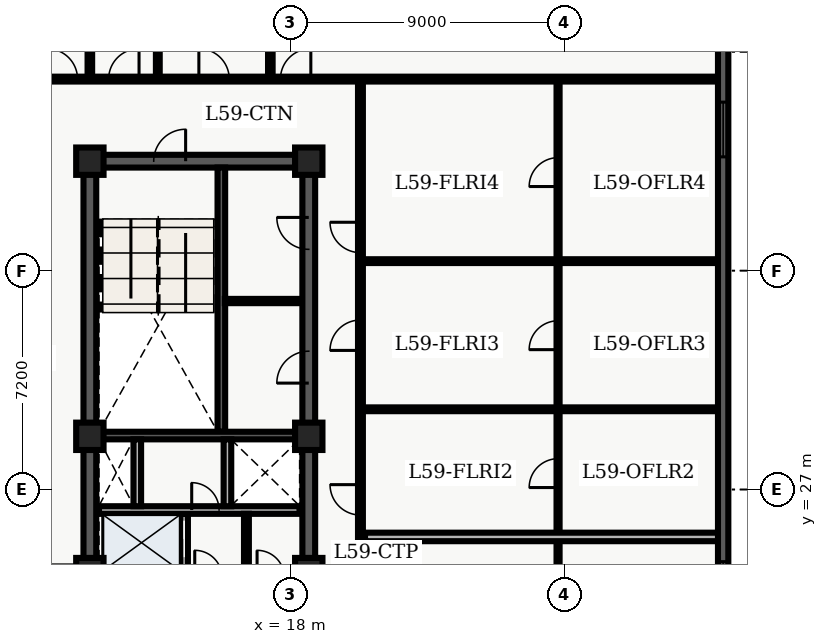
"""IFC4 building model, lengths in metres.
Left out: names, types, materials, properties, quantities, classifications, styles, units other than length and angle.
Written with IfcOpenShell. Run it as: python <this file> out.ifc"""

import sys

from ifc_helpers import new_model, entity, si_unit, converted_unit, direction, frame, origin_with_axes, origin_2d_with_axis, place, context, subcontext, project, spatial, polyline, rectangle, outline, extrude, element, fill, save


model = new_model("IFC4")
c1 = context("Model", 3, precision=1e-05, world=origin_with_axes(), true_north=direction((0.0, 1.0)))
c2 = subcontext(c1, "Body", "Model", "MODEL_VIEW")
j1 = project(units=[si_unit("LENGTHUNIT", "METRE"), converted_unit("PLANEANGLEUNIT", "DEGREE", entity("IfcPlaneAngleMeasure", 0.017), si_unit("PLANEANGLEUNIT", "RADIAN"), dimensions=[0, 0, 0, 0, 0, 0, 0])], contexts=[c1])
p1 = place(None, origin_with_axes())
s1 = spatial("IfcSite", under=j1, at=p1, CompositionType="ELEMENT")
p2 = place(p1, origin_with_axes())
s2 = spatial("IfcBuilding", under=s1, at=p2, CompositionType="ELEMENT")
p3 = place(p2, frame((0.0, 0.0, 240.3), z_axis=(0.0, 0.0, 1.0), x_axis=(1.0, 0.0, 0.0)))
s3 = spatial("IfcBuildingStorey", under=s2, at=p3, CompositionType="ELEMENT", Elevation=240.3)
p4 = place(p3, frame((11.4, 10.8, 0.0), z_axis=(0.0, 0.0, 1.0), x_axis=(0.0, 1.0, 0.0)))
e1 = element("IfcWall", 1, at=p4, inside=s3, PredefinedType="SHEAR", context=c2, shape_type="SweptSolid", body=[
    extrude(outline(polyline([(0.0, -0.21), (27.0, -0.21), (27.0, 0.21), (0.0, 0.21), (0.0, -0.21)])), origin_with_axes(), (0.0, 0.0, 1.0), 3.66),
])
p5 = place(p3, frame((11.4, 37.8, 0.0), z_axis=(0.0, 0.0, 1.0), x_axis=(1.0, 0.0, 0.0)))
e2 = element("IfcWall", 2, at=p5, inside=s3, PredefinedType="SHEAR", context=c2, shape_type="SweptSolid", body=[
    extrude(outline(polyline([(0.0, -0.21), (7.2, -0.21), (7.2, 0.21), (0.0, 0.21), (0.0, -0.21)])), origin_with_axes(), (0.0, 0.0, 1.0), 3.66),
])
p6 = place(p5, frame((2.625, 0.0, 0.0), z_axis=(0.0, 0.0, 1.0), x_axis=(1.0, 0.0, 0.0)))
e3 = element("IfcOpeningElement", 3, at=p6, cuts=e2, PredefinedType="OPENING", context=c2, shape_type="SweptSolid", body=[
    extrude(rectangle(XDim=1.05, YDim=0.44, at=origin_2d_with_axis()), origin_with_axes(), (0.0, 0.0, 1.0), 2.15),
])
p7 = place(p3, frame((18.6, 24.3, 0.0), z_axis=(0.0, 0.0, 1.0), x_axis=(0.0, 1.0, 0.0)))
e4 = element("IfcWall", 4, at=p7, inside=s3, PredefinedType="SHEAR", context=c2, shape_type="SweptSolid", body=[
    extrude(outline(polyline([(0.0, -0.21), (13.5, -0.21), (13.5, 0.21), (0.0, 0.21), (0.0, -0.21)])), origin_with_axes(), (0.0, 0.0, 1.0), 3.66),
])
p8 = place(p7, frame((6.725, 0.0, 0.0), z_axis=(0.0, 0.0, 1.0), x_axis=(1.0, 0.0, 0.0)))
e5 = element("IfcOpeningElement", 5, at=p8, cuts=e4, PredefinedType="OPENING", context=c2, shape_type="SweptSolid", body=[
    extrude(rectangle(XDim=1.05, YDim=0.44, at=origin_2d_with_axis()), origin_with_axes(), (0.0, 0.0, 1.0), 2.15),
])
p9 = place(p7, frame((11.125, 0.0, 0.0), z_axis=(0.0, 0.0, 1.0), x_axis=(1.0, 0.0, 0.0)))
e6 = element("IfcOpeningElement", 6, at=p9, cuts=e4, PredefinedType="OPENING", context=c2, shape_type="SweptSolid", body=[
    extrude(rectangle(XDim=1.05, YDim=0.44, at=origin_2d_with_axis()), origin_with_axes(), (0.0, 0.0, 1.0), 2.15),
])
p10 = place(p3, frame((15.725, 28.9, 0.0), z_axis=(0.0, 0.0, 1.0), x_axis=(0.0, 1.0, 0.0)))
e7 = element("IfcWall", 7, at=p10, inside=s3, PredefinedType="SHEAR", context=c2, shape_type="SweptSolid", body=[
    extrude(outline(polyline([(0.0, -0.125), (8.69, -0.125), (8.69, 0.125), (0.0, 0.125), (0.0, -0.125)])), origin_with_axes(), (0.0, 0.0, 1.0), 3.66),
])
p11 = place(p3, frame((11.61, 28.775, 0.0), z_axis=(0.0, 0.0, 1.0), x_axis=(1.0, 0.0, 0.0)))
e8 = element("IfcWall", 8, at=p11, inside=s3, PredefinedType="SHEAR", context=c2, shape_type="SweptSolid", body=[
    extrude(outline(polyline([(0.0, -0.125), (6.78, -0.125), (6.78, 0.125), (0.0, 0.125), (0.0, -0.125)])), origin_with_axes(), (0.0, 0.0, 1.0), 3.66),
])
p12 = place(p3, frame((14.5, 19.95, 0.0), z_axis=(0.0, 0.0, 1.0), x_axis=(0.0, 1.0, 0.0)))
e9 = element("IfcWall", 9, at=p12, inside=s3, PredefinedType="SOLIDWALL", context=c2, shape_type="SweptSolid", body=[
    extrude(outline(polyline([(0.0, -0.125), (6.25, -0.125), (6.25, 0.125), (0.0, 0.125), (0.0, -0.125)])), origin_with_axes(), (0.0, 0.0, 1.0), 2.7),
])
p13 = place(p12, frame((1.025, 0.0, 0.0), z_axis=(0.0, 0.0, 1.0), x_axis=(1.0, 0.0, 0.0)))
e10 = element("IfcOpeningElement", 10, at=p13, cuts=e9, PredefinedType="OPENING", context=c2, shape_type="SweptSolid", body=[
    extrude(rectangle(XDim=1.1, YDim=0.27, at=origin_2d_with_axis()), origin_with_axes(), (0.0, 0.0, 1.0), 2.15),
])
p14 = place(p12, frame((2.975, 0.0, 0.0), z_axis=(0.0, 0.0, 1.0), x_axis=(1.0, 0.0, 0.0)))
e11 = element("IfcOpeningElement", 11, at=p14, cuts=e9, PredefinedType="OPENING", context=c2, shape_type="SweptSolid", body=[
    extrude(rectangle(XDim=1.1, YDim=0.27, at=origin_2d_with_axis()), origin_with_axes(), (0.0, 0.0, 1.0), 2.15),
])
p15 = place(p12, frame((5.425, 0.0, 0.0), z_axis=(0.0, 0.0, 1.0), x_axis=(1.0, 0.0, 0.0)))
e12 = element("IfcOpeningElement", 12, at=p15, cuts=e9, PredefinedType="OPENING", context=c2, shape_type="SweptSolid", body=[
    extrude(rectangle(XDim=1.2, YDim=0.27, at=origin_2d_with_axis()), origin_with_axes(), (0.0, 0.0, 1.0), 2.15),
])
p16 = place(p3, frame((11.7, 26.325, 0.0), z_axis=(0.0, 0.0, 1.0), x_axis=(1.0, 0.0, 0.0)))
e13 = element("IfcWall", 13, at=p16, inside=s3, PredefinedType="SOLIDWALL", context=c2, shape_type="SweptSolid", body=[
    extrude(outline(polyline([(0.0, -0.125), (6.6, -0.125), (6.6, 0.125), (0.0, 0.125), (0.0, -0.125)])), origin_with_axes(), (0.0, 0.0, 1.0), 2.7),
])
p17 = place(p16, frame((3.5, 0.0, 0.0), z_axis=(0.0, 0.0, 1.0), x_axis=(1.0, 0.0, 0.0)))
e14 = element("IfcOpeningElement", 14, at=p17, cuts=e13, PredefinedType="OPENING", context=c2, shape_type="SweptSolid", body=[
    extrude(rectangle(XDim=0.9, YDim=0.27, at=origin_2d_with_axis()), origin_with_axes(), (0.0, 0.0, 1.0), 2.15),
])
for number, where, z_axis, x_axis in (
    (15, (12.96, 26.45, 0.0), (0.0, 0.0, 1.0), (0.0, 1.0, 0.0)),
    (16, (15.925, 26.45, 0.0), (0.0, 0.0, 1.0), (0.0, 1.0, 0.0)),
):
    element("IfcWall", number, at=place(p3, frame(where, z_axis=z_axis, x_axis=x_axis)), inside=s3, PredefinedType="SOLIDWALL", context=c2, shape_type="SweptSolid", body=[
        extrude(outline(polyline([(0.0, -0.125), (2.2, -0.125), (2.2, 0.125), (0.0, 0.125), (0.0, -0.125)])), origin_with_axes(), (0.0, 0.0, 1.0), 2.7),
    ])
for number, where, z_axis, x_axis in (
    (17, (11.4, 24.3, 0.0), (0.0, 0.0, 1.0), (1.0, 0.0, 0.0)),
    (18, (11.4, 28.75, 0.0), (0.0, 0.0, 1.0), (1.0, 0.0, 0.0)),
    (19, (11.4, 37.8, 0.0), (0.0, 0.0, 1.0), (1.0, 0.0, 0.0)),
    (20, (18.6, 24.3, 0.0), (0.0, 0.0, 1.0), (1.0, 0.0, 0.0)),
    (21, (18.6, 28.75, 0.0), (0.0, 0.0, 1.0), (1.0, 0.0, 0.0)),
    (22, (18.6, 37.8, 0.0), (0.0, 0.0, 1.0), (1.0, 0.0, 0.0)),
):
    element("IfcColumn", number, at=place(p3, frame(where, z_axis=z_axis, x_axis=x_axis)), inside=s3, PredefinedType="COLUMN", context=c2, shape_type="SweptSolid", body=[
        extrude(rectangle(XDim=0.9, YDim=0.9, at=origin_2d_with_axis()), origin_with_axes(), (0.0, 0.0, 1.0), 3.9),
    ])
p18 = place(p3, frame((16.55, 24.22, 0.0), z_axis=(0.0, 0.0, 1.0), x_axis=(0.0, 1.0, 0.0)))
e23 = element("IfcWall", 23, at=p18, inside=s3, PredefinedType="PARTITIONING", context=c2, shape_type="SweptSolid", body=[
    extrude(outline(polyline([(0.0, -0.08), (1.98, -0.08), (1.98, 0.08), (0.0, 0.08), (0.0, -0.08)])), origin_with_axes(), (0.0, 0.0, 1.0), 2.7),
])
p19 = place(p3, frame((15.84, 33.2, 0.0), z_axis=(0.0, 0.0, 1.0), x_axis=(1.0, 0.0, 0.0)))
e24 = element("IfcWall", 24, at=p19, inside=s3, PredefinedType="PARTITIONING", context=c2, shape_type="SweptSolid", body=[
    extrude(outline(polyline([(0.0, -0.07), (2.46, -0.07), (2.46, 0.07), (0.0, 0.07), (0.0, -0.07)])), origin_with_axes(), (0.0, 0.0, 1.0), 2.7),
])
p20 = place(p3, frame((7.1, 40.5, 0.0), z_axis=(0.0, 0.0, 1.0), x_axis=(1.0, 0.0, 0.0)))
e25 = element("IfcWall", 25, at=p20, inside=s3, PredefinedType="PARTITIONING", context=c2, shape_type="SweptSolid", body=[
    extrude(outline(polyline([(0.0, -0.08), (24.965, -0.08), (24.965, 0.08), (0.0, 0.08), (0.0, -0.08)])), origin_with_axes(), (0.0, 0.0, 1.0), 2.7),
])
p21 = place(p20, frame((3.395, 0.0, 0.0), z_axis=(0.0, 0.0, 1.0), x_axis=(1.0, 0.0, 0.0)))
e26 = element("IfcOpeningElement", 26, at=p21, cuts=e25, PredefinedType="OPENING", context=c2, shape_type="SweptSolid", body=[
    extrude(rectangle(XDim=1.0, YDim=0.18, at=origin_2d_with_axis()), origin_with_axes(), (0.0, 0.0, 1.0), 2.15),
])
p22 = place(p20, frame((5.418, 0.0, 0.0), z_axis=(0.0, 0.0, 1.0), x_axis=(1.0, 0.0, 0.0)))
e27 = element("IfcOpeningElement", 27, at=p22, cuts=e25, PredefinedType="OPENING", context=c2, shape_type="SweptSolid", body=[
    extrude(rectangle(XDim=1.0, YDim=0.18, at=origin_2d_with_axis()), origin_with_axes(), (0.0, 0.0, 1.0), 2.15),
])
p23 = place(p20, frame((8.386, 0.0, 0.0), z_axis=(0.0, 0.0, 1.0), x_axis=(1.0, 0.0, 0.0)))
e28 = element("IfcOpeningElement", 28, at=p23, cuts=e25, PredefinedType="OPENING", context=c2, shape_type="SweptSolid", body=[
    extrude(rectangle(XDim=1.0, YDim=0.18, at=origin_2d_with_axis()), origin_with_axes(), (0.0, 0.0, 1.0), 2.15),
])
p24 = place(p20, frame((11.068, 0.0, 0.0), z_axis=(0.0, 0.0, 1.0), x_axis=(1.0, 0.0, 0.0)))
e29 = element("IfcOpeningElement", 29, at=p24, cuts=e25, PredefinedType="OPENING", context=c2, shape_type="SweptSolid", body=[
    extrude(rectangle(XDim=1.0, YDim=0.18, at=origin_2d_with_axis()), origin_with_axes(), (0.0, 0.0, 1.0), 2.15),
])
p25 = place(p3, frame((20.3, 7.8, 0.0), z_axis=(0.0, 0.0, 1.0), x_axis=(0.0, 1.0, 0.0)))
e30 = element("IfcWall", 30, at=p25, inside=s3, PredefinedType="PARTITIONING", context=c2, shape_type="SweptSolid", body=[
    extrude(outline(polyline([(0.0, -0.08), (32.7, -0.08), (32.7, 0.08), (0.0, 0.08), (0.0, -0.08)])), origin_with_axes(), (0.0, 0.0, 1.0), 2.7),
])
p26 = place(p25, frame((14.55, 0.0, 0.0), z_axis=(0.0, 0.0, 1.0), x_axis=(1.0, 0.0, 0.0)))
e31 = element("IfcOpeningElement", 31, at=p26, cuts=e30, PredefinedType="OPENING", context=c2, shape_type="SweptSolid", body=[
    extrude(rectangle(XDim=0.9, YDim=0.18, at=origin_2d_with_axis()), origin_with_axes(), (0.0, 0.0, 1.0), 2.15),
])
p27 = place(p25, frame((18.86, 0.0, 0.0), z_axis=(0.0, 0.0, 1.0), x_axis=(1.0, 0.0, 0.0)))
e32 = element("IfcOpeningElement", 32, at=p27, cuts=e30, PredefinedType="OPENING", context=c2, shape_type="SweptSolid", body=[
    extrude(rectangle(XDim=1.0, YDim=0.18, at=origin_2d_with_axis()), origin_with_axes(), (0.0, 0.0, 1.0), 2.15),
])
p28 = place(p25, frame((24.276, 0.0, 0.0), z_axis=(0.0, 0.0, 1.0), x_axis=(1.0, 0.0, 0.0)))
e33 = element("IfcOpeningElement", 33, at=p28, cuts=e30, PredefinedType="OPENING", context=c2, shape_type="SweptSolid", body=[
    extrude(rectangle(XDim=1.0, YDim=0.18, at=origin_2d_with_axis()), origin_with_axes(), (0.0, 0.0, 1.0), 2.15),
])
p29 = place(p25, frame((27.491, 0.0, 0.0), z_axis=(0.0, 0.0, 1.0), x_axis=(1.0, 0.0, 0.0)))
e34 = element("IfcOpeningElement", 34, at=p29, cuts=e30, PredefinedType="OPENING", context=c2, shape_type="SweptSolid", body=[
    extrude(rectangle(XDim=1.0, YDim=0.18, at=origin_2d_with_axis()), origin_with_axes(), (0.0, 0.0, 1.0), 2.15),
])
p30 = place(p25, frame((5.775, 0.0, 0.0), z_axis=(0.0, 0.0, 1.0), x_axis=(1.0, 0.0, 0.0)))
e35 = element("IfcOpeningElement", 35, at=p30, cuts=e30, PredefinedType="OPENING", context=c2, shape_type="SweptSolid", body=[
    extrude(rectangle(XDim=1.05, YDim=0.18, at=origin_2d_with_axis()), origin_with_axes(), (0.0, 0.0, 1.0), 2.15),
])
p31 = place(p3, frame((11.4, 40.6, 0.0), z_axis=(0.0, 0.0, 1.0), x_axis=(0.0, 1.0, 0.0)))
e36 = element("IfcWall", 36, at=p31, inside=s3, PredefinedType="PARTITIONING", context=c2, shape_type="SweptSolid", body=[
    extrude(outline(polyline([(0.0, -0.075), (7.665, -0.075), (7.665, 0.075), (0.0, 0.075), (0.0, -0.075)])), origin_with_axes(), (0.0, 0.0, 1.0), 2.7),
])
p32 = place(p3, frame((13.635, 40.6, 0.0), z_axis=(0.0, 0.0, 1.0), x_axis=(0.0, 1.0, 0.0)))
e37 = element("IfcWall", 37, at=p32, inside=s3, PredefinedType="PARTITIONING", context=c2, shape_type="SweptSolid", body=[
    extrude(outline(polyline([(0.0, -0.062), (7.665, -0.062), (7.665, 0.062), (0.0, 0.062), (0.0, -0.062)])), origin_with_axes(), (0.0, 0.0, 1.0), 2.7),
])
p33 = place(p3, frame((17.336, 40.6, 0.0), z_axis=(0.0, 0.0, 1.0), x_axis=(0.0, 1.0, 0.0)))
e38 = element("IfcWall", 38, at=p33, inside=s3, PredefinedType="PARTITIONING", context=c2, shape_type="SweptSolid", body=[
    extrude(outline(polyline([(0.0, -0.075), (7.665, -0.075), (7.665, 0.075), (0.0, 0.075), (0.0, -0.075)])), origin_with_axes(), (0.0, 0.0, 1.0), 2.7),
])
p34 = place(p3, frame((26.8, 21.8, 0.0), z_axis=(0.0, 0.0, 1.0), x_axis=(0.0, 1.0, 0.0)))
e39 = element("IfcWall", 39, at=p34, inside=s3, PredefinedType="PARTITIONING", context=c2, shape_type="SweptSolid", body=[
    extrude(outline(polyline([(0.0, -0.05), (18.5, -0.05), (18.5, 0.05), (0.0, 0.05), (0.0, -0.05)])), origin_with_axes(), (0.0, 0.0, 1.0), 2.7),
])
p35 = place(p34, frame((1.785, 0.0, 0.0), z_axis=(0.0, 0.0, 1.0), x_axis=(1.0, 0.0, 0.0)))
e40 = element("IfcOpeningElement", 40, at=p35, cuts=e39, PredefinedType="OPENING", context=c2, shape_type="SweptSolid", body=[
    extrude(rectangle(XDim=0.95, YDim=0.12, at=origin_2d_with_axis()), origin_with_axes(), (0.0, 0.0, 1.0), 2.15),
])
p36 = place(p34, frame((5.739, 0.0, 0.0), z_axis=(0.0, 0.0, 1.0), x_axis=(1.0, 0.0, 0.0)))
e41 = element("IfcOpeningElement", 41, at=p36, cuts=e39, PredefinedType="OPENING", context=c2, shape_type="SweptSolid", body=[
    extrude(rectangle(XDim=0.95, YDim=0.12, at=origin_2d_with_axis()), origin_with_axes(), (0.0, 0.0, 1.0), 2.15),
])
p37 = place(p34, frame((10.275, 0.0, 0.0), z_axis=(0.0, 0.0, 1.0), x_axis=(1.0, 0.0, 0.0)))
e42 = element("IfcOpeningElement", 42, at=p37, cuts=e39, PredefinedType="OPENING", context=c2, shape_type="SweptSolid", body=[
    extrude(rectangle(XDim=0.95, YDim=0.12, at=origin_2d_with_axis()), origin_with_axes(), (0.0, 0.0, 1.0), 2.15),
])
p38 = place(p34, frame((15.641, 0.0, 0.0), z_axis=(0.0, 0.0, 1.0), x_axis=(1.0, 0.0, 0.0)))
e43 = element("IfcOpeningElement", 43, at=p38, cuts=e39, PredefinedType="OPENING", context=c2, shape_type="SweptSolid", body=[
    extrude(rectangle(XDim=0.95, YDim=0.12, at=origin_2d_with_axis()), origin_with_axes(), (0.0, 0.0, 1.0), 2.15),
])
p39 = place(p3, frame((20.45, 25.44, 0.0), z_axis=(0.0, 0.0, 1.0), x_axis=(1.0, 0.0, 0.0)))
e44 = element("IfcWall", 44, at=p39, inside=s3, PredefinedType="PARTITIONING", context=c2, shape_type="SweptSolid", body=[
    extrude(outline(polyline([(0.0, -0.14), (11.615, -0.14), (11.615, 0.14), (0.0, 0.14), (0.0, -0.14)])), origin_with_axes(), (0.0, 0.0, 1.0), 2.7),
])
for number, where, z_axis, x_axis in (
    (45, (20.45, 29.639, 0.0), (0.0, 0.0, 1.0), (1.0, 0.0, 0.0)),
    (46, (20.45, 34.512, 0.0), (0.0, 0.0, 1.0), (1.0, 0.0, 0.0)),
):
    element("IfcWall", number, at=place(p3, frame(where, z_axis=z_axis, x_axis=x_axis)), inside=s3, PredefinedType="PARTITIONING", context=c2, shape_type="SweptSolid", body=[
        extrude(outline(polyline([(0.0, -0.062), (11.615, -0.062), (11.615, 0.062), (0.0, 0.062), (0.0, -0.062)])), origin_with_axes(), (0.0, 0.0, 1.0), 2.7),
    ])
p40 = place(p3, frame((32.23, 41.82, 0.0), z_axis=(0.0, 0.0, 1.0), x_axis=(0.0, -1.0, 0.0)))
e47 = element("IfcWall", 47, at=p40, inside=s3, PredefinedType="SOLIDWALL", context=c2, shape_type="SweptSolid", body=[
    extrude(outline(polyline([(0.0, -0.17), (20.22, -0.17), (20.22, 0.17), (0.0, 0.17), (0.0, -0.17)])), origin_with_axes(), (0.0, 0.0, 1.0), 3.66),
])
p41 = place(p40, frame((2.978, 0.0, 0.45), z_axis=(0.0, 0.0, 1.0), x_axis=(1.0, 0.0, 0.0)))
e48 = element("IfcOpeningElement", 48, at=p41, cuts=e47, PredefinedType="OPENING", context=c2, shape_type="SweptSolid", body=[
    extrude(rectangle(XDim=1.8, YDim=0.36, at=origin_2d_with_axis()), origin_with_axes(), (0.0, 0.0, 1.0), 2.1),
])
p42 = place(p40, frame((18.093, 0.0, 0.45), z_axis=(0.0, 0.0, 1.0), x_axis=(1.0, 0.0, 0.0)))
e49 = element("IfcOpeningElement", 49, at=p42, cuts=e47, PredefinedType="OPENING", context=c2, shape_type="SweptSolid", body=[
    extrude(rectangle(XDim=1.8, YDim=0.36, at=origin_2d_with_axis()), origin_with_axes(), (0.0, 0.0, 1.0), 2.1),
])
p43 = place(p12, frame((5.425, 0.0, 0.0), z_axis=(0.0, 0.0, 1.0), x_axis=(1.0, 0.0, 0.0)))
e50 = element("IfcDoor", 50, at=p43, inside=s3, OperationType="DOUBLE_DOOR_SLIDING", PredefinedType="DOOR", context=c2, shape_type="SweptSolid", body=[
    extrude(rectangle(XDim=1.2, YDim=0.09, at=origin_2d_with_axis()), origin_with_axes(), (0.0, 0.0, 1.0), 2.15),
])
fill(e12, e50)
p44 = place(p5, frame((2.625, 0.0, 0.0), z_axis=(0.0, 0.0, 1.0), x_axis=(1.0, 0.0, 0.0)))
e51 = element("IfcDoor", 51, at=p44, inside=s3, OperationType="SINGLE_SWING_RIGHT", PredefinedType="DOOR", context=c2, shape_type="SweptSolid", body=[
    extrude(rectangle(XDim=1.05, YDim=0.09, at=origin_2d_with_axis()), origin_with_axes(), (0.0, 0.0, 1.0), 2.15),
])
fill(e3, e51)
p45 = place(p16, frame((3.5, 0.0, 0.0), z_axis=(0.0, 0.0, 1.0), x_axis=(1.0, 0.0, 0.0)))
e52 = element("IfcDoor", 52, at=p45, inside=s3, OperationType="SINGLE_SWING_LEFT", PredefinedType="DOOR", context=c2, shape_type="SweptSolid", body=[
    extrude(rectangle(XDim=0.9, YDim=0.09, at=origin_2d_with_axis()), origin_with_axes(), (0.0, 0.0, 1.0), 2.15),
])
fill(e14, e52)
p46 = place(p7, frame((6.725, 0.0, 0.0), z_axis=(0.0, 0.0, 1.0), x_axis=(1.0, 0.0, 0.0)))
e53 = element("IfcDoor", 53, at=p46, inside=s3, OperationType="SINGLE_SWING_LEFT", PredefinedType="DOOR", context=c2, shape_type="SweptSolid", body=[
    extrude(rectangle(XDim=1.05, YDim=0.09, at=origin_2d_with_axis()), origin_with_axes(), (0.0, 0.0, 1.0), 2.15),
])
fill(e5, e53)
p47 = place(p7, frame((11.125, 0.0, 0.0), z_axis=(0.0, 0.0, 1.0), x_axis=(1.0, 0.0, 0.0)))
e54 = element("IfcDoor", 54, at=p47, inside=s3, OperationType="SINGLE_SWING_RIGHT", PredefinedType="DOOR", context=c2, shape_type="SweptSolid", body=[
    extrude(rectangle(XDim=1.05, YDim=0.09, at=origin_2d_with_axis()), origin_with_axes(), (0.0, 0.0, 1.0), 2.15),
])
fill(e6, e54)
p48 = place(p20, frame((3.395, 0.0, 0.0), z_axis=(0.0, 0.0, 1.0), x_axis=(1.0, 0.0, 0.0)))
e55 = element("IfcDoor", 55, at=p48, inside=s3, OperationType="SINGLE_SWING_LEFT", PredefinedType="DOOR", context=c2, shape_type="SweptSolid", body=[
    extrude(rectangle(XDim=1.0, YDim=0.09, at=origin_2d_with_axis()), origin_with_axes(), (0.0, 0.0, 1.0), 2.15),
])
fill(e26, e55)
p49 = place(p20, frame((5.418, 0.0, 0.0), z_axis=(0.0, 0.0, 1.0), x_axis=(1.0, 0.0, 0.0)))
e56 = element("IfcDoor", 56, at=p49, inside=s3, OperationType="SINGLE_SWING_RIGHT", PredefinedType="DOOR", context=c2, shape_type="SweptSolid", body=[
    extrude(rectangle(XDim=1.0, YDim=0.09, at=origin_2d_with_axis()), origin_with_axes(), (0.0, 0.0, 1.0), 2.15),
])
fill(e27, e56)
p50 = place(p20, frame((8.386, 0.0, 0.0), z_axis=(0.0, 0.0, 1.0), x_axis=(1.0, 0.0, 0.0)))
e57 = element("IfcDoor", 57, at=p50, inside=s3, OperationType="SINGLE_SWING_LEFT", PredefinedType="DOOR", context=c2, shape_type="SweptSolid", body=[
    extrude(rectangle(XDim=1.0, YDim=0.09, at=origin_2d_with_axis()), origin_with_axes(), (0.0, 0.0, 1.0), 2.15),
])
fill(e28, e57)
p51 = place(p20, frame((11.068, 0.0, 0.0), z_axis=(0.0, 0.0, 1.0), x_axis=(1.0, 0.0, 0.0)))
e58 = element("IfcDoor", 58, at=p51, inside=s3, OperationType="SINGLE_SWING_RIGHT", PredefinedType="DOOR", context=c2, shape_type="SweptSolid", body=[
    extrude(rectangle(XDim=1.0, YDim=0.09, at=origin_2d_with_axis()), origin_with_axes(), (0.0, 0.0, 1.0), 2.15),
])
fill(e29, e58)
p52 = place(p34, frame((5.739, 0.0, 0.0), z_axis=(0.0, 0.0, 1.0), x_axis=(1.0, 0.0, 0.0)))
e59 = element("IfcDoor", 59, at=p52, inside=s3, OperationType="SINGLE_SWING_LEFT", PredefinedType="DOOR", context=c2, shape_type="SweptSolid", body=[
    extrude(rectangle(XDim=0.95, YDim=0.06, at=origin_2d_with_axis()), origin_with_axes(), (0.0, 0.0, 1.0), 2.15),
])
fill(e41, e59)
p53 = place(p25, frame((18.86, 0.0, 0.0), z_axis=(0.0, 0.0, 1.0), x_axis=(1.0, 0.0, 0.0)))
e60 = element("IfcDoor", 60, at=p53, inside=s3, OperationType="SINGLE_SWING_RIGHT", PredefinedType="DOOR", context=c2, shape_type="SweptSolid", body=[
    extrude(rectangle(XDim=1.0, YDim=0.09, at=origin_2d_with_axis()), origin_with_axes(), (0.0, 0.0, 1.0), 2.15),
])
fill(e32, e60)
p54 = place(p34, frame((10.275, 0.0, 0.0), z_axis=(0.0, 0.0, 1.0), x_axis=(1.0, 0.0, 0.0)))
e61 = element("IfcDoor", 61, at=p54, inside=s3, OperationType="SINGLE_SWING_LEFT", PredefinedType="DOOR", context=c2, shape_type="SweptSolid", body=[
    extrude(rectangle(XDim=0.95, YDim=0.06, at=origin_2d_with_axis()), origin_with_axes(), (0.0, 0.0, 1.0), 2.15),
])
fill(e42, e61)
p55 = place(p25, frame((24.276, 0.0, 0.0), z_axis=(0.0, 0.0, 1.0), x_axis=(1.0, 0.0, 0.0)))
e62 = element("IfcDoor", 62, at=p55, inside=s3, OperationType="SINGLE_SWING_LEFT", PredefinedType="DOOR", context=c2, shape_type="SweptSolid", body=[
    extrude(rectangle(XDim=1.0, YDim=0.09, at=origin_2d_with_axis()), origin_with_axes(), (0.0, 0.0, 1.0), 2.15),
])
fill(e33, e62)
p56 = place(p34, frame((15.641, 0.0, 0.0), z_axis=(0.0, 0.0, 1.0), x_axis=(1.0, 0.0, 0.0)))
e63 = element("IfcDoor", 63, at=p56, inside=s3, OperationType="SINGLE_SWING_LEFT", PredefinedType="DOOR", context=c2, shape_type="SweptSolid", body=[
    extrude(rectangle(XDim=0.95, YDim=0.06, at=origin_2d_with_axis()), origin_with_axes(), (0.0, 0.0, 1.0), 2.15),
])
fill(e43, e63)
p57 = place(p25, frame((27.491, 0.0, 0.0), z_axis=(0.0, 0.0, 1.0), x_axis=(1.0, 0.0, 0.0)))
e64 = element("IfcDoor", 64, at=p57, inside=s3, OperationType="SINGLE_SWING_RIGHT", PredefinedType="DOOR", context=c2, shape_type="SweptSolid", body=[
    extrude(rectangle(XDim=1.0, YDim=0.09, at=origin_2d_with_axis()), origin_with_axes(), (0.0, 0.0, 1.0), 2.15),
])
fill(e34, e64)
p58 = place(p40, frame((2.978, 0.0, 0.45), z_axis=(0.0, 0.0, 1.0), x_axis=(1.0, 0.0, 0.0)))
e65 = element("IfcWindow", 65, at=p58, inside=s3, PredefinedType="WINDOW", context=c2, shape_type="SweptSolid", body=[
    extrude(rectangle(XDim=1.8, YDim=0.09, at=origin_2d_with_axis()), origin_with_axes(), (0.0, 0.0, 1.0), 2.1),
])
fill(e48, e65)
p59 = place(p40, frame((18.093, 0.0, 0.45), z_axis=(0.0, 0.0, 1.0), x_axis=(1.0, 0.0, 0.0)))
e66 = element("IfcWindow", 66, at=p59, inside=s3, PredefinedType="WINDOW", context=c2, shape_type="SweptSolid", body=[
    extrude(rectangle(XDim=1.8, YDim=0.09, at=origin_2d_with_axis()), origin_with_axes(), (0.0, 0.0, 1.0), 2.1),
])
fill(e49, e66)
save(model, sys.argv[1])
